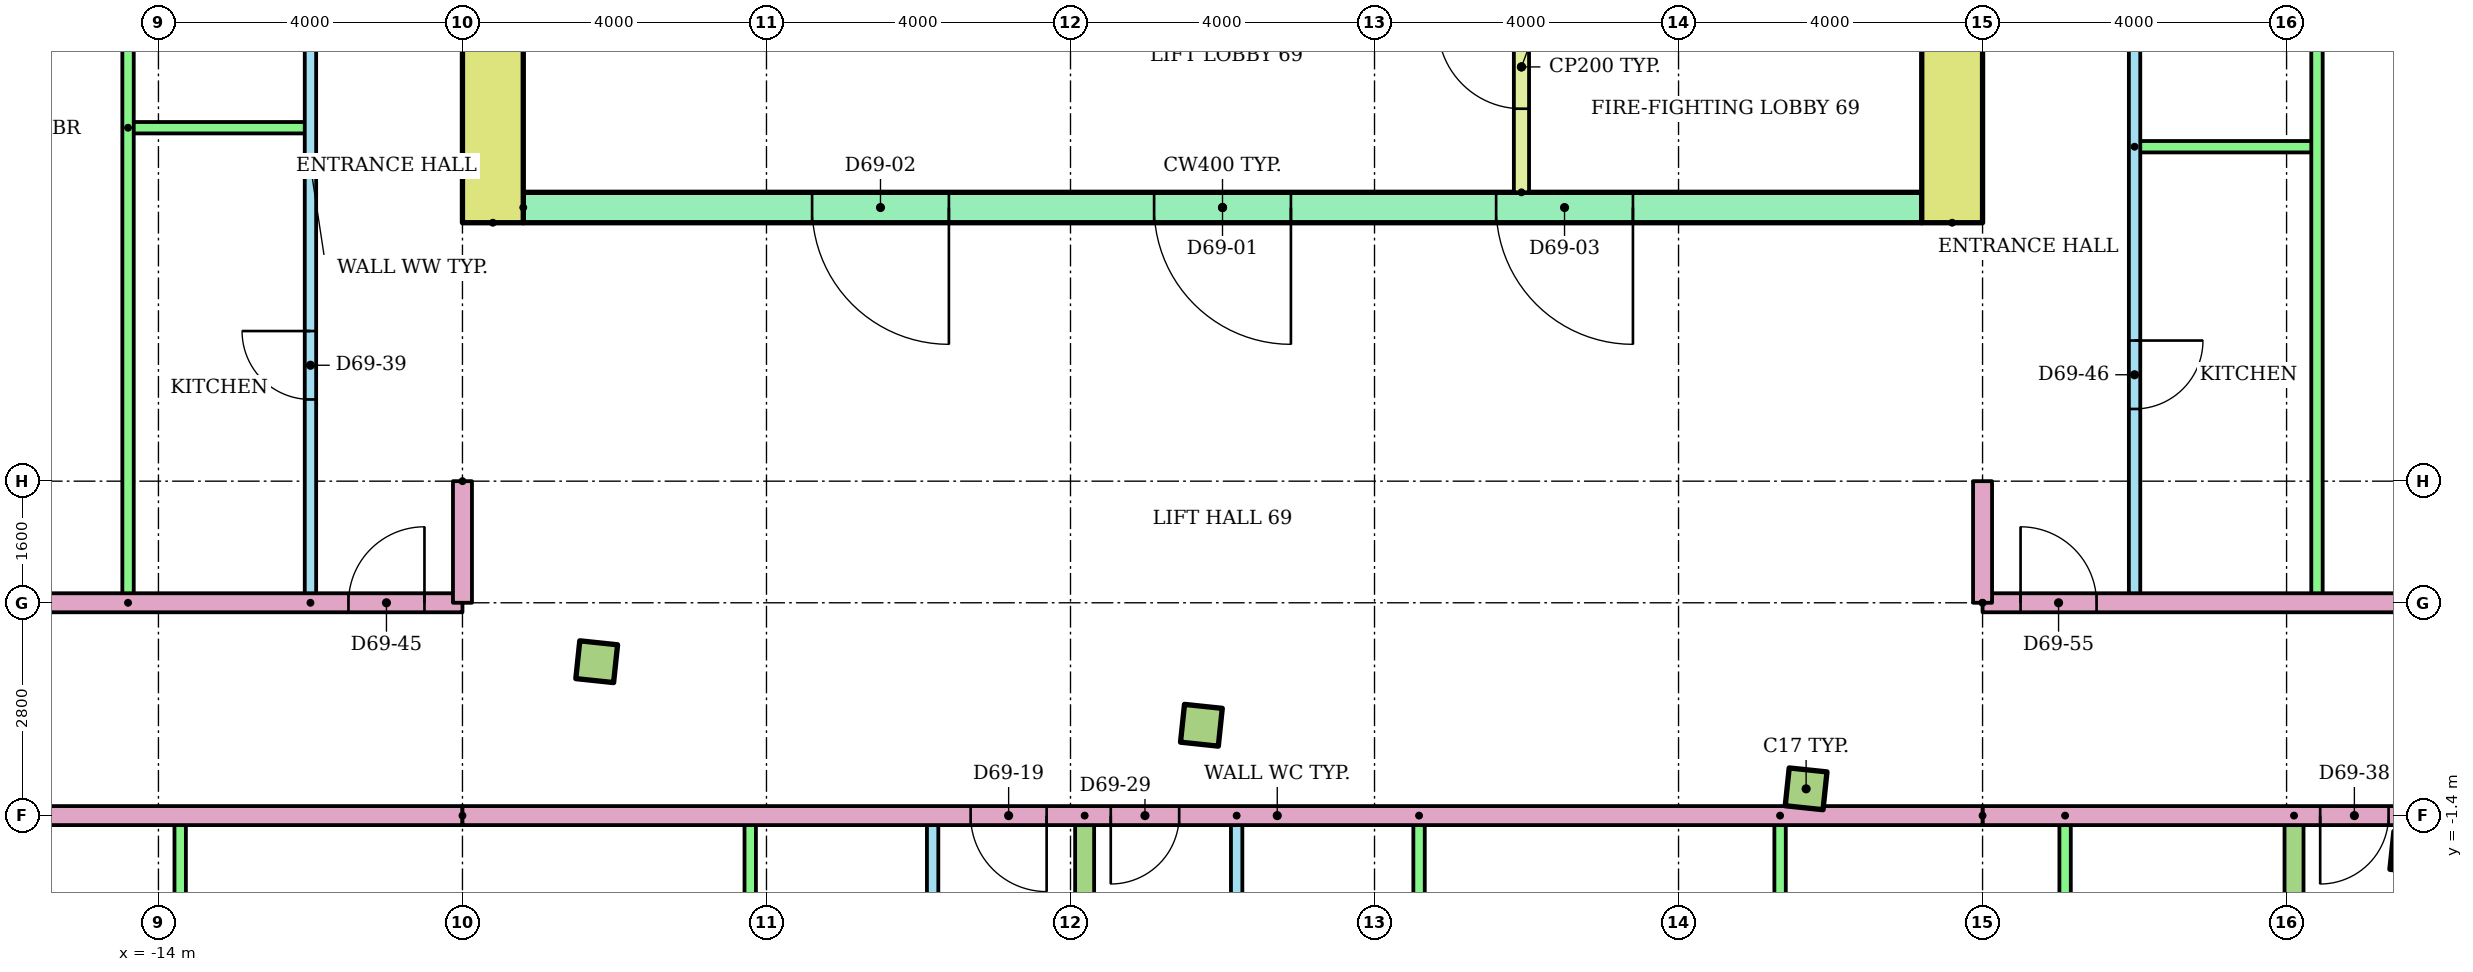
"""IFC4 building model, lengths in metres.
Left out: names, types, materials, properties, quantities, classifications, styles, units other than length and angle.
Written with IfcOpenShell. Run it as: python <this file> out.ifc"""

import sys

from ifc_helpers import new_model, si_unit, direction, frame, frame_2d, origin, origin_2d, place, context, subcontext, project, spatial, rectangle, extrude, element, fill, save


model = new_model("IFC4")
c1 = context("Model", 3, precision=1e-05, world=origin(), true_north=direction((0.0, 1.0)))
c2 = subcontext(c1, "Body", "Model", "MODEL_VIEW")
j1 = project(units=[si_unit("LENGTHUNIT", "METRE"), si_unit("PLANEANGLEUNIT", "RADIAN")], contexts=[c1])
p1 = place(None, origin())
s1 = spatial("IfcSite", under=j1, at=p1, CompositionType="ELEMENT")
p2 = place(p1, origin())
s2 = spatial("IfcBuilding", under=s1, at=p2, CompositionType="ELEMENT")
p3 = place(p2, frame((0.0, 0.0, 265.9)))
s3 = spatial("IfcBuildingStorey", under=s2, at=p3, CompositionType="ELEMENT", Elevation=265.9)
for number, where, z_axis, x_axis in (
    (1, (-8.234, 0.625, 0.0), (0.0, 0.0, 1.0), (0.995, -0.105, 0.0)),
    (2, (-0.278, -0.211, 0.0), (0.0, 0.0, 1.0), (0.995, -0.105, 0.0)),
    (3, (7.678, -1.048, 0.0), (0.0, 0.0, 1.0), (0.995, -0.105, 0.0)),
    (4, (15.635, -1.884, 0.0), (0.0, 0.0, 1.0), (0.995, -0.105, 0.0)),
):
    element("IfcColumn", number, at=place(p3, frame(where, z_axis=z_axis, x_axis=x_axis)), inside=s3, PredefinedType="COLUMN", context=c2, shape_type="SweptSolid", body=[
        extrude(rectangle(XDim=0.5, YDim=0.5, at=origin_2d()), origin(), (0.0, 0.0, 1.0), 3.2),
    ])
for number, where, z_axis, x_axis in (
    (5, (-9.6, 6.4, 0.0), (0.0, 0.0, 1.0), (0.0, 1.0, 0.0)),
    (6, (9.6, 6.4, 0.0), (0.0, 0.0, 1.0), (0.0, 1.0, 0.0)),
):
    element("IfcWall", number, at=place(p3, frame(where, z_axis=z_axis, x_axis=x_axis)), inside=s3, PredefinedType="SHEAR", context=c2, shape_type="SweptSolid", body=[
        extrude(rectangle(XDim=13.6, YDim=0.8, at=frame_2d((6.8, 0.0))), origin(), (0.0, 0.0, 1.0), 2.92),
    ])
p4 = place(p3, frame((-9.2, 6.6, 0.0)))
e7 = element("IfcWall", 7, at=p4, inside=s3, PredefinedType="SHEAR", context=c2, shape_type="SweptSolid", body=[
    extrude(rectangle(XDim=18.4, YDim=0.4, at=frame_2d((9.2, 0.0))), origin(), (0.0, 0.0, 1.0), 2.92),
])
p5 = place(p4, frame((8.3, 0.0, 0.0)))
e8 = element("IfcOpeningElement", 8, at=p5, cuts=e7, PredefinedType="OPENING", context=c2, shape_type="SweptSolid", body=[
    extrude(rectangle(XDim=1.8, YDim=2.1, at=frame_2d((0.9, 1.05))), frame((0.0, 0.21, 0.0), z_axis=(0.0, -1.0, 0.0), x_axis=(1.0, 0.0, 0.0)), (0.0, 0.0, 1.0), 0.42),
])
p6 = place(p4, frame((3.8, 0.0, 0.0)))
e9 = element("IfcOpeningElement", 9, at=p6, cuts=e7, PredefinedType="OPENING", context=c2, shape_type="SweptSolid", body=[
    extrude(rectangle(XDim=1.8, YDim=2.1, at=frame_2d((0.9, 1.05))), frame((0.0, 0.21, 0.0), z_axis=(0.0, -1.0, 0.0), x_axis=(1.0, 0.0, 0.0)), (0.0, 0.0, 1.0), 0.42),
])
p7 = place(p4, frame((12.8, 0.0, 0.0)))
e10 = element("IfcOpeningElement", 10, at=p7, cuts=e7, PredefinedType="OPENING", context=c2, shape_type="SweptSolid", body=[
    extrude(rectangle(XDim=1.8, YDim=2.1, at=frame_2d((0.9, 1.05))), frame((0.0, 0.21, 0.0), z_axis=(0.0, -1.0, 0.0), x_axis=(1.0, 0.0, 0.0)), (0.0, 0.0, 1.0), 0.42),
])
p8 = place(p3, frame((3.933, 6.8, 0.0), z_axis=(0.0, 0.0, 1.0), x_axis=(0.0, 1.0, 0.0)))
e11 = element("IfcWall", 11, at=p8, inside=s3, PredefinedType="PARTITIONING", context=c2, shape_type="SweptSolid", body=[
    extrude(rectangle(XDim=3.3, YDim=0.2, at=frame_2d((1.65, 0.0))), origin(), (0.0, 0.0, 1.0), 2.92),
])
p9 = place(p8, frame((1.1, 0.0, 0.0)))
e12 = element("IfcOpeningElement", 12, at=p9, cuts=e11, PredefinedType="OPENING", context=c2, shape_type="SweptSolid", body=[
    extrude(rectangle(XDim=1.1, YDim=2.1, at=frame_2d((0.55, 1.05))), frame((0.0, 0.11, 0.0), z_axis=(0.0, -1.0, 0.0), x_axis=(1.0, 0.0, 0.0)), (0.0, 0.0, 1.0), 0.22),
])
p10 = place(p3, frame((-3.814, -7.047, 0.0), z_axis=(0.0, 0.0, 1.0), x_axis=(0.0, 1.0, 0.0)))
e13 = element("IfcWall", 13, at=p10, inside=s3, PredefinedType="PARTITIONING", context=c2, shape_type="SweptSolid", body=[
    extrude(rectangle(XDim=5.647, YDim=0.15, at=frame_2d((2.823, 0.0))), origin(), (0.0, 0.0, 1.0), 2.4),
])
p11 = place(p10, frame((3.697, 0.0, 0.0)))
e14 = element("IfcOpeningElement", 14, at=p11, cuts=e13, PredefinedType="OPENING", context=c2, shape_type="SweptSolid", body=[
    extrude(rectangle(XDim=0.9, YDim=2.1, at=frame_2d((0.45, 1.05))), frame((0.0, 0.085, 0.0), z_axis=(0.0, -1.0, 0.0), x_axis=(1.0, 0.0, 0.0)), (0.0, 0.0, 1.0), 0.17),
])
p12 = place(p10, frame((0.923, 0.0, 0.0)))
e15 = element("IfcOpeningElement", 15, at=p12, cuts=e13, PredefinedType="OPENING", context=c2, shape_type="SweptSolid", body=[
    extrude(rectangle(XDim=0.8, YDim=2.1, at=frame_2d((0.4, 1.05))), frame((0.0, 0.085, 0.0), z_axis=(0.0, -1.0, 0.0), x_axis=(1.0, 0.0, 0.0)), (0.0, 0.0, 1.0), 0.17),
])
for number, where, z_axis, x_axis in (
    (16, (-6.214, -7.047, 0.0), (0.0, 0.0, 1.0), (0.0, 1.0, 0.0)),
    (17, (-13.714, -7.047, 0.0), (0.0, 0.0, 1.0), (0.0, 1.0, 0.0)),
):
    element("IfcWall", number, at=place(p3, frame(where, z_axis=z_axis, x_axis=x_axis)), inside=s3, PredefinedType="PARTITIONING", context=c2, shape_type="SweptSolid", body=[
        extrude(rectangle(XDim=5.647, YDim=0.15, at=frame_2d((2.823, 0.0))), origin(), (0.0, 0.0, 1.0), 2.4),
    ])
p13 = place(p3, frame((0.186, -1.4, 0.0), z_axis=(0.0, 0.0, 1.0), x_axis=(0.0, -1.0, 0.0)))
e18 = element("IfcWall", 18, at=p13, inside=s3, PredefinedType="PARTITIONING", context=c2, shape_type="SweptSolid", body=[
    extrude(rectangle(XDim=7.484, YDim=0.15, at=frame_2d((3.742, 0.0))), origin(), (0.0, 0.0, 1.0), 2.4),
])
p14 = place(p13, frame((1.55, 0.0, 0.0)))
e19 = element("IfcOpeningElement", 19, at=p14, cuts=e18, PredefinedType="OPENING", context=c2, shape_type="SweptSolid", body=[
    extrude(rectangle(XDim=0.9, YDim=2.1, at=frame_2d((0.45, 1.05))), frame((0.0, 0.085, 0.0), z_axis=(0.0, -1.0, 0.0), x_axis=(1.0, 0.0, 0.0)), (0.0, 0.0, 1.0), 0.17),
])
p15 = place(p13, frame((4.966, 0.0, 0.0)))
e20 = element("IfcOpeningElement", 20, at=p15, cuts=e18, PredefinedType="OPENING", context=c2, shape_type="SweptSolid", body=[
    extrude(rectangle(XDim=0.8, YDim=2.1, at=frame_2d((0.4, 1.05))), frame((0.0, 0.085, 0.0), z_axis=(0.0, -1.0, 0.0), x_axis=(1.0, 0.0, 0.0)), (0.0, 0.0, 1.0), 0.17),
])
for number, where, z_axis, x_axis in (
    (21, (2.586, -1.4, 0.0), (0.0, 0.0, 1.0), (0.0, -1.0, 0.0)),
    (22, (7.336, -1.4, 0.0), (0.0, 0.0, 1.0), (0.0, -1.0, 0.0)),
    (23, (11.086, -1.4, 0.0), (0.0, 0.0, 1.0), (0.0, -1.0, 0.0)),
):
    element("IfcWall", number, at=place(p3, frame(where, z_axis=z_axis, x_axis=x_axis)), inside=s3, PredefinedType="PARTITIONING", context=c2, shape_type="SweptSolid", body=[
        extrude(rectangle(XDim=7.484, YDim=0.15, at=frame_2d((3.742, 0.0))), origin(), (0.0, 0.0, 1.0), 2.4),
    ])
p16 = place(p3, frame((-1.814, -1.4, 0.0), z_axis=(0.0, 0.0, 1.0), x_axis=(0.0, -1.0, 0.0)))
e24 = element("IfcWall", 24, at=p16, inside=s3, PredefinedType="PARTITIONING", context=c2, shape_type="SweptSolid", body=[
    extrude(rectangle(XDim=13.341, YDim=0.25, at=frame_2d((6.67, 0.0))), origin(), (0.0, 0.0, 1.0), 2.4),
])
p17 = place(p3, frame((14.098, -1.4, 0.0), z_axis=(0.0, 0.0, 1.0), x_axis=(0.0, -1.0, 0.0)))
e25 = element("IfcWall", 25, at=p17, inside=s3, PredefinedType="PARTITIONING", context=c2, shape_type="SweptSolid", body=[
    extrude(rectangle(XDim=15.013, YDim=0.25, at=frame_2d((7.506, 0.0))), origin(), (0.0, 0.0, 1.0), 2.4),
])
p18 = place(p3, frame((-10.0, -1.4, 0.0), z_axis=(0.0, 0.0, 1.0), x_axis=(-1.0, 0.0, 0.0)))
e26 = element("IfcWall", 26, at=p18, inside=s3, PredefinedType="PARTITIONING", context=c2, shape_type="SweptSolid", body=[
    extrude(rectangle(XDim=13.56, YDim=0.25, at=frame_2d((6.78, 0.0))), origin(), (0.0, 0.0, 1.0), 2.4),
])
p19 = place(p3, frame((25.0, -1.4, 0.0), z_axis=(0.0, 0.0, 1.0), x_axis=(-1.0, 0.0, 0.0)))
e27 = element("IfcWall", 27, at=p19, inside=s3, PredefinedType="PARTITIONING", context=c2, shape_type="SweptSolid", body=[
    extrude(rectangle(XDim=15.0, YDim=0.25, at=frame_2d((7.5, 0.0))), origin(), (0.0, 0.0, 1.0), 2.4),
])
p20 = place(p19, frame((9.658, 0.0, 0.0)))
e28 = element("IfcOpeningElement", 28, at=p20, cuts=e27, PredefinedType="OPENING", context=c2, shape_type="SweptSolid", body=[
    extrude(rectangle(XDim=0.9, YDim=2.1, at=frame_2d((0.45, 1.05))), frame((0.0, 0.135, 0.0), z_axis=(0.0, -1.0, 0.0), x_axis=(1.0, 0.0, 0.0)), (0.0, 0.0, 1.0), 0.27),
])
p21 = place(p3, frame((-12.0, 1.4, 0.0), z_axis=(0.0, 0.0, 1.0), x_axis=(0.0, 1.0, 0.0)))
e29 = element("IfcWall", 29, at=p21, inside=s3, PredefinedType="PARTITIONING", context=c2, shape_type="SweptSolid", body=[
    extrude(rectangle(XDim=11.5, YDim=0.15, at=frame_2d((5.75, 0.0))), origin(), (0.0, 0.0, 1.0), 2.4),
])
p22 = place(p21, frame((2.675, 0.0, 0.0)))
e30 = element("IfcOpeningElement", 30, at=p22, cuts=e29, PredefinedType="OPENING", context=c2, shape_type="SweptSolid", body=[
    extrude(rectangle(XDim=0.9, YDim=2.1, at=frame_2d((0.45, 1.05))), frame((0.0, 0.085, 0.0), z_axis=(0.0, -1.0, 0.0), x_axis=(1.0, 0.0, 0.0)), (0.0, 0.0, 1.0), 0.17),
])
p23 = place(p21, frame((8.475, 0.0, 0.0)))
e31 = element("IfcOpeningElement", 31, at=p23, cuts=e29, PredefinedType="OPENING", context=c2, shape_type="SweptSolid", body=[
    extrude(rectangle(XDim=0.8, YDim=2.1, at=frame_2d((0.4, 1.05))), frame((0.0, 0.085, 0.0), z_axis=(0.0, -1.0, 0.0), x_axis=(1.0, 0.0, 0.0)), (0.0, 0.0, 1.0), 0.17),
])
p24 = place(p3, frame((-14.4, 7.65, 0.0)))
e32 = element("IfcWall", 32, at=p24, inside=s3, PredefinedType="PARTITIONING", context=c2, shape_type="SweptSolid", body=[
    extrude(rectangle(XDim=2.4, YDim=0.15, at=frame_2d((1.2, 0.0))), origin(), (0.0, 0.0, 1.0), 2.4),
])
p25 = place(p3, frame((-14.4, 1.4, 0.0), z_axis=(0.0, 0.0, 1.0), x_axis=(0.0, 1.0, 0.0)))
e33 = element("IfcWall", 33, at=p25, inside=s3, PredefinedType="PARTITIONING", context=c2, shape_type="SweptSolid", body=[
    extrude(rectangle(XDim=11.5, YDim=0.15, at=frame_2d((5.75, 0.0))), origin(), (0.0, 0.0, 1.0), 2.4),
])
p26 = place(p3, frame((-23.265, 1.4, 0.0)))
e34 = element("IfcWall", 34, at=p26, inside=s3, PredefinedType="PARTITIONING", context=c2, shape_type="SweptSolid", body=[
    extrude(rectangle(XDim=13.265, YDim=0.25, at=frame_2d((6.633, 0.0))), origin(), (0.0, 0.0, 1.0), 2.4),
])
p27 = place(p26, frame((11.765, 0.0, 0.0)))
e35 = element("IfcOpeningElement", 35, at=p27, cuts=e34, PredefinedType="OPENING", context=c2, shape_type="SweptSolid", body=[
    extrude(rectangle(XDim=1.0, YDim=2.1, at=frame_2d((0.5, 1.05))), frame((0.0, 0.135, 0.0), z_axis=(0.0, -1.0, 0.0), x_axis=(1.0, 0.0, 0.0)), (0.0, 0.0, 1.0), 0.27),
])
p28 = place(p3, frame((12.0, 12.143, 0.0), z_axis=(0.0, 0.0, 1.0), x_axis=(0.0, -1.0, 0.0)))
e36 = element("IfcWall", 36, at=p28, inside=s3, PredefinedType="PARTITIONING", context=c2, shape_type="SweptSolid", body=[
    extrude(rectangle(XDim=10.743, YDim=0.15, at=frame_2d((5.372, 0.0))), origin(), (0.0, 0.0, 1.0), 2.4),
])
p29 = place(p28, frame((7.293, 0.0, 0.0)))
e37 = element("IfcOpeningElement", 37, at=p29, cuts=e36, PredefinedType="OPENING", context=c2, shape_type="SweptSolid", body=[
    extrude(rectangle(XDim=0.9, YDim=2.1, at=frame_2d((0.45, 1.05))), frame((0.0, 0.085, 0.0), z_axis=(0.0, -1.0, 0.0), x_axis=(1.0, 0.0, 0.0)), (0.0, 0.0, 1.0), 0.17),
])
p30 = place(p28, frame((1.972, 0.0, 0.0)))
e38 = element("IfcOpeningElement", 38, at=p30, cuts=e36, PredefinedType="OPENING", context=c2, shape_type="SweptSolid", body=[
    extrude(rectangle(XDim=0.8, YDim=2.1, at=frame_2d((0.4, 1.05))), frame((0.0, 0.085, 0.0), z_axis=(0.0, -1.0, 0.0), x_axis=(1.0, 0.0, 0.0)), (0.0, 0.0, 1.0), 0.17),
])
p31 = place(p3, frame((12.0, 7.4, 0.0)))
e39 = element("IfcWall", 39, at=p31, inside=s3, PredefinedType="PARTITIONING", context=c2, shape_type="SweptSolid", body=[
    extrude(rectangle(XDim=2.4, YDim=0.15, at=frame_2d((1.2, 0.0))), origin(), (0.0, 0.0, 1.0), 2.4),
])
p32 = place(p3, frame((14.4, 12.143, 0.0), z_axis=(0.0, 0.0, 1.0), x_axis=(0.0, -1.0, 0.0)))
e40 = element("IfcWall", 40, at=p32, inside=s3, PredefinedType="PARTITIONING", context=c2, shape_type="SweptSolid", body=[
    extrude(rectangle(XDim=10.743, YDim=0.15, at=frame_2d((5.372, 0.0))), origin(), (0.0, 0.0, 1.0), 2.4),
])
p33 = place(p3, frame((10.0, 1.4, 0.0)))
e41 = element("IfcWall", 41, at=p33, inside=s3, PredefinedType="PARTITIONING", context=c2, shape_type="SweptSolid", body=[
    extrude(rectangle(XDim=15.0, YDim=0.25, at=frame_2d((7.5, 0.0))), origin(), (0.0, 0.0, 1.0), 2.4),
])
p34 = place(p33, frame((0.5, 0.0, 0.0)))
e42 = element("IfcOpeningElement", 42, at=p34, cuts=e41, PredefinedType="OPENING", context=c2, shape_type="SweptSolid", body=[
    extrude(rectangle(XDim=1.0, YDim=2.1, at=frame_2d((0.5, 1.05))), frame((0.0, 0.135, 0.0), z_axis=(0.0, -1.0, 0.0), x_axis=(1.0, 0.0, 0.0)), (0.0, 0.0, 1.0), 0.27),
])
p35 = place(p3, frame((10.0, -1.4, 0.0), z_axis=(0.0, 0.0, 1.0), x_axis=(-1.0, 0.0, 0.0)))
e43 = element("IfcWall", 43, at=p35, inside=s3, PredefinedType="PARTITIONING", context=c2, shape_type="SweptSolid", body=[
    extrude(rectangle(XDim=20.0, YDim=0.25, at=frame_2d((10.0, 0.0))), origin(), (0.0, 0.0, 1.0), 2.4),
])
p36 = place(p35, frame((12.314, 0.0, 0.0)))
e44 = element("IfcOpeningElement", 44, at=p36, cuts=e43, PredefinedType="OPENING", context=c2, shape_type="SweptSolid", body=[
    extrude(rectangle(XDim=1.0, YDim=2.1, at=frame_2d((0.5, 1.05))), frame((0.0, 0.135, 0.0), z_axis=(0.0, -1.0, 0.0), x_axis=(1.0, 0.0, 0.0)), (0.0, 0.0, 1.0), 0.27),
])
p37 = place(p35, frame((10.57, 0.0, 0.0)))
e45 = element("IfcOpeningElement", 45, at=p37, cuts=e43, PredefinedType="OPENING", context=c2, shape_type="SweptSolid", body=[
    extrude(rectangle(XDim=0.9, YDim=2.1, at=frame_2d((0.45, 1.05))), frame((0.0, 0.135, 0.0), z_axis=(0.0, -1.0, 0.0), x_axis=(1.0, 0.0, 0.0)), (0.0, 0.0, 1.0), 0.27),
])
for number, where, z_axis, x_axis in (
    (46, (-10.0, 3.0, 0.0), (0.0, 0.0, 1.0), (0.0, -1.0, 0.0)),
    (47, (10.0, 1.4, 0.0), (0.0, 0.0, 1.0), (0.0, 1.0, 0.0)),
):
    element("IfcWall", number, at=place(p3, frame(where, z_axis=z_axis, x_axis=x_axis)), inside=s3, PredefinedType="PARTITIONING", context=c2, shape_type="SweptSolid", body=[
        extrude(rectangle(XDim=1.6, YDim=0.25, at=frame_2d((0.8, 0.0))), origin(), (0.0, 0.0, 1.0), 2.4),
    ])
p38 = place(p5, frame((1.8, 0.0, 0.0), z_axis=(0.0, 0.0, 1.0), x_axis=(-1.0, 0.0, 0.0)))
e48 = element("IfcDoor", 48, at=p38, inside=s3, OperationType="DOUBLE_DOOR_SINGLE_SWING", PredefinedType="DOOR", context=c2, shape_type="SweptSolid", body=[
    extrude(rectangle(XDim=1.8, YDim=2.1, at=frame_2d((0.9, 1.05))), frame((0.0, 0.025, 0.0), z_axis=(0.0, -1.0, 0.0), x_axis=(1.0, 0.0, 0.0)), (0.0, 0.0, 1.0), 0.05),
])
fill(e8, e48)
p39 = place(p6, frame((1.8, 0.0, 0.0), z_axis=(0.0, 0.0, 1.0), x_axis=(-1.0, 0.0, 0.0)))
e49 = element("IfcDoor", 49, at=p39, inside=s3, OperationType="DOUBLE_DOOR_SINGLE_SWING", PredefinedType="DOOR", context=c2, shape_type="SweptSolid", body=[
    extrude(rectangle(XDim=1.8, YDim=2.1, at=frame_2d((0.9, 1.05))), frame((0.0, 0.025, 0.0), z_axis=(0.0, -1.0, 0.0), x_axis=(1.0, 0.0, 0.0)), (0.0, 0.0, 1.0), 0.05),
])
fill(e9, e49)
p40 = place(p7, frame((1.8, 0.0, 0.0), z_axis=(0.0, 0.0, 1.0), x_axis=(-1.0, 0.0, 0.0)))
e50 = element("IfcDoor", 50, at=p40, inside=s3, OperationType="DOUBLE_DOOR_SINGLE_SWING", PredefinedType="DOOR", context=c2, shape_type="SweptSolid", body=[
    extrude(rectangle(XDim=1.8, YDim=2.1, at=frame_2d((0.9, 1.05))), frame((0.0, 0.025, 0.0), z_axis=(0.0, -1.0, 0.0), x_axis=(1.0, 0.0, 0.0)), (0.0, 0.0, 1.0), 0.05),
])
fill(e10, e50)
p41 = place(p9, origin())
e51 = element("IfcDoor", 51, at=p41, inside=s3, OperationType="SINGLE_SWING_RIGHT", PredefinedType="DOOR", context=c2, shape_type="SweptSolid", body=[
    extrude(rectangle(XDim=1.1, YDim=2.1, at=frame_2d((0.55, 1.05))), frame((0.0, 0.025, 0.0), z_axis=(0.0, -1.0, 0.0), x_axis=(1.0, 0.0, 0.0)), (0.0, 0.0, 1.0), 0.05),
])
fill(e12, e51)
p42 = place(p36, origin())
e52 = element("IfcDoor", 52, at=p42, inside=s3, OperationType="SINGLE_SWING_LEFT", PredefinedType="DOOR", context=c2, shape_type="SweptSolid", body=[
    extrude(rectangle(XDim=1.0, YDim=2.1, at=frame_2d((0.5, 1.05))), frame((0.0, 0.025, 0.0), z_axis=(0.0, -1.0, 0.0), x_axis=(1.0, 0.0, 0.0)), (0.0, 0.0, 1.0), 0.05),
])
fill(e44, e52)
p43 = place(p37, origin())
e53 = element("IfcDoor", 53, at=p43, inside=s3, OperationType="SINGLE_SWING_RIGHT", PredefinedType="DOOR", context=c2, shape_type="SweptSolid", body=[
    extrude(rectangle(XDim=0.9, YDim=2.1, at=frame_2d((0.45, 1.05))), frame((0.0, 0.025, 0.0), z_axis=(0.0, -1.0, 0.0), x_axis=(1.0, 0.0, 0.0)), (0.0, 0.0, 1.0), 0.05),
])
fill(e45, e53)
p44 = place(p20, origin())
e54 = element("IfcDoor", 54, at=p44, inside=s3, OperationType="SINGLE_SWING_RIGHT", PredefinedType="DOOR", context=c2, shape_type="SweptSolid", body=[
    extrude(rectangle(XDim=0.9, YDim=2.1, at=frame_2d((0.45, 1.05))), frame((0.0, 0.025, 0.0), z_axis=(0.0, -1.0, 0.0), x_axis=(1.0, 0.0, 0.0)), (0.0, 0.0, 1.0), 0.05),
])
fill(e28, e54)
p45 = place(p22, origin())
e55 = element("IfcDoor", 55, at=p45, inside=s3, OperationType="SINGLE_SWING_RIGHT", PredefinedType="DOOR", context=c2, shape_type="SweptSolid", body=[
    extrude(rectangle(XDim=0.9, YDim=2.1, at=frame_2d((0.45, 1.05))), frame((0.0, 0.025, 0.0), z_axis=(0.0, -1.0, 0.0), x_axis=(1.0, 0.0, 0.0)), (0.0, 0.0, 1.0), 0.05),
])
fill(e30, e55)
p46 = place(p27, origin())
e56 = element("IfcDoor", 56, at=p46, inside=s3, OperationType="SINGLE_SWING_RIGHT", PredefinedType="DOOR", context=c2, shape_type="SweptSolid", body=[
    extrude(rectangle(XDim=1.0, YDim=2.1, at=frame_2d((0.5, 1.05))), frame((0.0, 0.025, 0.0), z_axis=(0.0, -1.0, 0.0), x_axis=(1.0, 0.0, 0.0)), (0.0, 0.0, 1.0), 0.05),
])
fill(e35, e56)
p47 = place(p29, origin())
e57 = element("IfcDoor", 57, at=p47, inside=s3, OperationType="SINGLE_SWING_LEFT", PredefinedType="DOOR", context=c2, shape_type="SweptSolid", body=[
    extrude(rectangle(XDim=0.9, YDim=2.1, at=frame_2d((0.45, 1.05))), frame((0.0, 0.025, 0.0), z_axis=(0.0, -1.0, 0.0), x_axis=(1.0, 0.0, 0.0)), (0.0, 0.0, 1.0), 0.05),
])
fill(e37, e57)
p48 = place(p34, origin())
e58 = element("IfcDoor", 58, at=p48, inside=s3, OperationType="SINGLE_SWING_LEFT", PredefinedType="DOOR", context=c2, shape_type="SweptSolid", body=[
    extrude(rectangle(XDim=1.0, YDim=2.1, at=frame_2d((0.5, 1.05))), frame((0.0, 0.025, 0.0), z_axis=(0.0, -1.0, 0.0), x_axis=(1.0, 0.0, 0.0)), (0.0, 0.0, 1.0), 0.05),
])
fill(e42, e58)
save(model, sys.argv[1])
